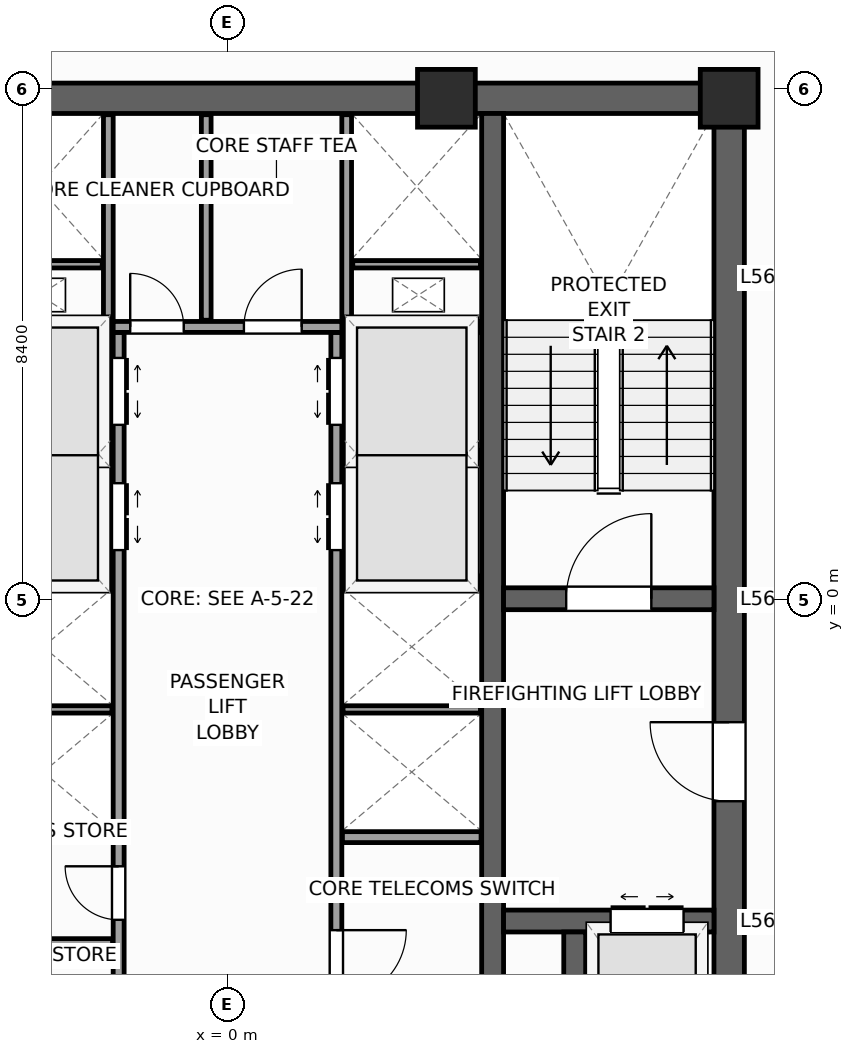
"""IFC4 building model, lengths in metres.
Left out: names, types, materials, properties, quantities, classifications, styles, units other than length and angle.
Written with IfcOpenShell. Run it as: python <this file> out.ifc"""

import sys

from ifc_helpers import new_model, si_unit, direction, frame, frame_2d, origin, origin_2d, place, context, subcontext, project, spatial, rectangle, extrude, source, transform, mapped, element, fill, save


model = new_model("IFC4")
c1 = context("Model", 3, precision=1e-05, world=origin(), true_north=direction((0.0, 1.0)))
c2 = subcontext(c1, "Body", "Model", "MODEL_VIEW")
j1 = project(units=[si_unit("LENGTHUNIT", "METRE"), si_unit("PLANEANGLEUNIT", "RADIAN")], contexts=[c1])
p1 = place(None, origin())
s1 = spatial("IfcSite", under=j1, at=p1, CompositionType="ELEMENT")
p2 = place(p1, origin())
s2 = spatial("IfcBuilding", under=s1, at=p2, CompositionType="ELEMENT")
p3 = place(p2, frame((0.0, 0.0, 232.9)))
s3 = spatial("IfcBuildingStorey", under=s2, at=p3, CompositionType="ELEMENT", Elevation=232.9)
p4 = place(p3, frame((-8.5, 8.25, 0.0), z_axis=(0.0, 0.0, 1.0), x_axis=(1.0, 0.0, 0.0)))
e1 = element("IfcWall", 1, at=p4, inside=s3, PredefinedType="SHEAR", context=c2, shape_type="SweptSolid", body=[
    extrude(rectangle(XDim=17.0, YDim=0.5, at=frame_2d((8.5, 0.0))), origin(), (0.0, 0.0, 1.0), 3.9),
])
p5 = place(p3, frame((8.25, -8.0, 0.0), z_axis=(0.0, 0.0, 1.0), x_axis=(0.0, 1.0, 0.0)))
e2 = element("IfcWall", 2, at=p5, inside=s3, PredefinedType="SHEAR", context=c2, shape_type="SweptSolid", body=[
    extrude(rectangle(XDim=16.0, YDim=0.5, at=frame_2d((8.0, 0.0))), origin(), (0.0, 0.0, 1.0), 3.9),
])
p6 = place(p5, frame((4.69, 0.0, 0.0)))
e3 = element("IfcOpeningElement", 3, at=p6, cuts=e2, PredefinedType="OPENING", context=c2, shape_type="SweptSolid", body=[
    extrude(rectangle(XDim=1.3, YDim=2.2, at=frame_2d((0.65, 1.1))), frame((0.0, 0.26, 0.0), z_axis=(0.0, -1.0, 0.0), x_axis=(1.0, 0.0, 0.0)), (0.0, 0.0, 1.0), 0.52),
])
p7 = place(p3, frame((4.36, -8.0, 0.0), z_axis=(0.0, 0.0, 1.0), x_axis=(0.0, 1.0, 0.0)))
e4 = element("IfcWall", 4, at=p7, inside=s3, PredefinedType="SHEAR", context=c2, shape_type="SweptSolid", body=[
    extrude(rectangle(XDim=16.0, YDim=0.36, at=frame_2d((8.0, 0.0))), origin(), (0.0, 0.0, 1.0), 3.9),
])
p8 = place(p3, frame((4.54, 0.02, 0.0), z_axis=(0.0, 0.0, 1.0), x_axis=(1.0, 0.0, 0.0)))
e5 = element("IfcWall", 5, at=p8, inside=s3, PredefinedType="SHEAR", context=c2, shape_type="SweptSolid", body=[
    extrude(rectangle(XDim=3.46, YDim=0.36, at=frame_2d((1.73, 0.0))), origin(), (0.0, 0.0, 1.0), 3.9),
])
p9 = place(p8, frame((1.03, 0.0, 0.0)))
e6 = element("IfcOpeningElement", 6, at=p9, cuts=e5, PredefinedType="OPENING", context=c2, shape_type="SweptSolid", body=[
    extrude(rectangle(XDim=1.4, YDim=2.2, at=frame_2d((0.7, 1.1))), frame((0.0, 0.19, 0.0), z_axis=(0.0, -1.0, 0.0), x_axis=(1.0, 0.0, 0.0)), (0.0, 0.0, 1.0), 0.38),
])
p10 = place(p3, frame((4.54, -5.28, 0.0), z_axis=(0.0, 0.0, 1.0), x_axis=(1.0, 0.0, 0.0)))
e7 = element("IfcWall", 7, at=p10, inside=s3, PredefinedType="SHEAR", context=c2, shape_type="SweptSolid", body=[
    extrude(rectangle(XDim=3.46, YDim=0.36, at=frame_2d((1.73, 0.0))), origin(), (0.0, 0.0, 1.0), 3.9),
])
p11 = place(p10, frame((1.76, 0.0, 0.0)))
e8 = element("IfcOpeningElement", 8, at=p11, cuts=e7, PredefinedType="OPENING", context=c2, shape_type="SweptSolid", body=[
    extrude(rectangle(XDim=1.2, YDim=2.25, at=frame_2d((0.6, 1.125))), frame((0.0, 0.19, 0.0), z_axis=(0.0, -1.0, 0.0), x_axis=(1.0, 0.0, 0.0)), (0.0, 0.0, 1.0), 0.38),
])
p12 = place(p3, frame((5.71, -8.0, 0.0), z_axis=(0.0, 0.0, 1.0), x_axis=(0.0, 1.0, 0.0)))
e9 = element("IfcWall", 9, at=p12, inside=s3, PredefinedType="SHEAR", context=c2, shape_type="SweptSolid", body=[
    extrude(rectangle(XDim=2.54, YDim=0.36, at=frame_2d((1.27, 0.0))), origin(), (0.0, 0.0, 1.0), 3.9),
])
m1 = source(origin(), c2, "Body", "SweptSolid", [
    extrude(rectangle(XDim=0.95, YDim=0.95, at=origin_2d()), origin(), (0.0, 0.0, 1.0), 3.9),
])
for number, where, z_axis, x_axis in (
    (10, (8.25, 8.25, 0.0), (0.0, 0.0, 1.0), (1.0, 0.0, 0.0)),
    (11, (3.6, 8.25, 0.0), (0.0, 0.0, 1.0), (1.0, 0.0, 0.0)),
):
    element("IfcColumn", number, at=place(p3, frame(where, z_axis=z_axis, x_axis=x_axis)), inside=s3, PredefinedType="PILASTER", context=c2, shape_type="MappedRepresentation", body=[
        mapped(m1, transform((0.0, 0.0, 0.0), scale=1.0)),
    ])
p13 = place(p3, frame((6.733, -29.154, 0.0), z_axis=(0.0, 0.0, 1.0), x_axis=(0.629325378072, 0.77714192302, 0.0)))
e12 = element("IfcWall", 12, at=p13, inside=s3, PredefinedType="STANDARD", context=c2, shape_type="SweptSolid", body=[
    extrude(rectangle(XDim=36.84, YDim=0.34, at=frame_2d((18.42, 0.0))), origin(), (0.0, 0.0, 1.0), 2.96),
])
p14 = place(p13, frame((23.495, 0.0, 0.0)))
e13 = element("IfcOpeningElement", 13, at=p14, cuts=e12, PredefinedType="OPENING", context=c2, shape_type="SweptSolid", body=[
    extrude(rectangle(XDim=1.05, YDim=2.25, at=frame_2d((0.525, 1.125))), frame((0.0, 0.18, 0.0), z_axis=(0.0, -1.0, 0.0), x_axis=(1.0, 0.0, 0.0)), (0.0, 0.0, 1.0), 0.36),
])
p15 = place(p13, frame((3.721, 0.0, 0.48)))
e14 = element("IfcOpeningElement", 14, at=p15, cuts=e12, PredefinedType="OPENING", context=c2, shape_type="SweptSolid", body=[
    extrude(rectangle(XDim=1.4, YDim=2.4, at=frame_2d((0.7, 1.2))), frame((0.0, 0.18, 0.0), z_axis=(0.0, -1.0, 0.0), x_axis=(1.0, 0.0, 0.0)), (0.0, 0.0, 1.0), 0.36),
])
p16 = place(p13, frame((10.559, 0.0, 0.58)))
e15 = element("IfcOpeningElement", 15, at=p16, cuts=e12, PredefinedType="OPENING", context=c2, shape_type="SweptSolid", body=[
    extrude(rectangle(XDim=1.75, YDim=2.3, at=frame_2d((0.875, 1.15))), frame((0.0, 0.18, 0.0), z_axis=(0.0, -1.0, 0.0), x_axis=(1.0, 0.0, 0.0)), (0.0, 0.0, 1.0), 0.36),
])
p17 = place(p13, frame((16.058, 0.0, 0.58)))
e16 = element("IfcOpeningElement", 16, at=p17, cuts=e12, PredefinedType="OPENING", context=c2, shape_type="SweptSolid", body=[
    extrude(rectangle(XDim=1.75, YDim=2.3, at=frame_2d((0.875, 1.15))), frame((0.0, 0.18, 0.0), z_axis=(0.0, -1.0, 0.0), x_axis=(1.0, 0.0, 0.0)), (0.0, 0.0, 1.0), 0.36),
])
p18 = place(p13, frame((25.676, 0.0, 0.58)))
e17 = element("IfcOpeningElement", 17, at=p18, cuts=e12, PredefinedType="OPENING", context=c2, shape_type="SweptSolid", body=[
    extrude(rectangle(XDim=1.75, YDim=2.3, at=frame_2d((0.875, 1.15))), frame((0.0, 0.18, 0.0), z_axis=(0.0, -1.0, 0.0), x_axis=(1.0, 0.0, 0.0)), (0.0, 0.0, 1.0), 0.36),
])
p19 = place(p13, frame((30.982, 0.0, 0.48)))
e18 = element("IfcOpeningElement", 18, at=p19, cuts=e12, PredefinedType="OPENING", context=c2, shape_type="SweptSolid", body=[
    extrude(rectangle(XDim=1.4, YDim=2.4, at=frame_2d((0.7, 1.2))), frame((0.0, 0.18, 0.0), z_axis=(0.0, -1.0, 0.0), x_axis=(1.0, 0.0, 0.0)), (0.0, 0.0, 1.0), 0.36),
])
p20 = place(p3, frame((29.154, 6.733, 0.0), z_axis=(0.0, 0.0, 1.0), x_axis=(-0.77714192302, 0.629325378072, 0.0)))
e19 = element("IfcWall", 19, at=p20, inside=s3, PredefinedType="STANDARD", context=c2, shape_type="SweptSolid", body=[
    extrude(rectangle(XDim=36.84, YDim=0.34, at=frame_2d((18.42, 0.0))), origin(), (0.0, 0.0, 1.0), 2.96),
])
p21 = place(p20, frame((3.721, 0.0, 0.48)))
e20 = element("IfcOpeningElement", 20, at=p21, cuts=e19, PredefinedType="OPENING", context=c2, shape_type="SweptSolid", body=[
    extrude(rectangle(XDim=1.4, YDim=2.4, at=frame_2d((0.7, 1.2))), frame((0.0, 0.18, 0.0), z_axis=(0.0, -1.0, 0.0), x_axis=(1.0, 0.0, 0.0)), (0.0, 0.0, 1.0), 0.36),
])
p22 = place(p20, frame((9.809, 0.0, 0.58)))
e21 = element("IfcOpeningElement", 21, at=p22, cuts=e19, PredefinedType="OPENING", context=c2, shape_type="SweptSolid", body=[
    extrude(rectangle(XDim=1.75, YDim=2.3, at=frame_2d((0.875, 1.15))), frame((0.0, 0.18, 0.0), z_axis=(0.0, -1.0, 0.0), x_axis=(1.0, 0.0, 0.0)), (0.0, 0.0, 1.0), 0.36),
])
p23 = place(p20, frame((16.058, 0.0, 0.58)))
e22 = element("IfcOpeningElement", 22, at=p23, cuts=e19, PredefinedType="OPENING", context=c2, shape_type="SweptSolid", body=[
    extrude(rectangle(XDim=1.75, YDim=2.3, at=frame_2d((0.875, 1.15))), frame((0.0, 0.18, 0.0), z_axis=(0.0, -1.0, 0.0), x_axis=(1.0, 0.0, 0.0)), (0.0, 0.0, 1.0), 0.36),
])
p24 = place(p20, frame((24.176, 0.0, 0.58)))
e23 = element("IfcOpeningElement", 23, at=p24, cuts=e19, PredefinedType="OPENING", context=c2, shape_type="SweptSolid", body=[
    extrude(rectangle(XDim=1.75, YDim=2.3, at=frame_2d((0.875, 1.15))), frame((0.0, 0.18, 0.0), z_axis=(0.0, -1.0, 0.0), x_axis=(1.0, 0.0, 0.0)), (0.0, 0.0, 1.0), 0.36),
])
p25 = place(p20, frame((32.482, 0.0, 0.48)))
e24 = element("IfcOpeningElement", 24, at=p25, cuts=e19, PredefinedType="OPENING", context=c2, shape_type="SweptSolid", body=[
    extrude(rectangle(XDim=1.4, YDim=2.4, at=frame_2d((0.7, 1.2))), frame((0.0, 0.18, 0.0), z_axis=(0.0, -1.0, 0.0), x_axis=(1.0, 0.0, 0.0)), (0.0, 0.0, 1.0), 0.36),
])
p26 = place(p3, frame((-1.79, -7.98, 0.0), z_axis=(0.0, 0.0, 1.0), x_axis=(0.0, 1.0, 0.0)))
e25 = element("IfcWall", 25, at=p26, inside=s3, PredefinedType="PARTITIONING", context=c2, shape_type="SweptSolid", body=[
    extrude(rectangle(XDim=12.38, YDim=0.18, at=frame_2d((6.19, 0.0))), origin(), (0.0, 0.0, 1.0), 3.66),
])
p27 = place(p26, frame((8.8, 0.0, 0.0)))
e26 = element("IfcOpeningElement", 26, at=p27, cuts=e25, PredefinedType="OPENING", context=c2, shape_type="SweptSolid", body=[
    extrude(rectangle(XDim=1.1, YDim=2.2, at=frame_2d((0.55, 1.1))), frame((0.0, 0.1, 0.0), z_axis=(0.0, -1.0, 0.0), x_axis=(1.0, 0.0, 0.0)), (0.0, 0.0, 1.0), 0.2),
])
p28 = place(p26, frame((10.86, 0.0, 0.0)))
e27 = element("IfcOpeningElement", 27, at=p28, cuts=e25, PredefinedType="OPENING", context=c2, shape_type="SweptSolid", body=[
    extrude(rectangle(XDim=1.1, YDim=2.2, at=frame_2d((0.55, 1.1))), frame((0.0, 0.1, 0.0), z_axis=(0.0, -1.0, 0.0), x_axis=(1.0, 0.0, 0.0)), (0.0, 0.0, 1.0), 0.2),
])
p29 = place(p26, frame((0.55, 0.0, 0.0)))
e28 = element("IfcOpeningElement", 28, at=p29, cuts=e25, PredefinedType="OPENING", context=c2, shape_type="SweptSolid", body=[
    extrude(rectangle(XDim=1.15, YDim=2.25, at=frame_2d((0.575, 1.125))), frame((0.0, 0.1, 0.0), z_axis=(0.0, -1.0, 0.0), x_axis=(1.0, 0.0, 0.0)), (0.0, 0.0, 1.0), 0.2),
])
p30 = place(p26, frame((2.72, 0.0, 0.0)))
e29 = element("IfcOpeningElement", 29, at=p30, cuts=e25, PredefinedType="OPENING", context=c2, shape_type="SweptSolid", body=[
    extrude(rectangle(XDim=0.88, YDim=2.1, at=frame_2d((0.44, 1.05))), frame((0.0, 0.1, 0.0), z_axis=(0.0, -1.0, 0.0), x_axis=(1.0, 0.0, 0.0)), (0.0, 0.0, 1.0), 0.2),
])
p31 = place(p3, frame((1.79, -7.98, 0.0), z_axis=(0.0, 0.0, 1.0), x_axis=(0.0, 1.0, 0.0)))
e30 = element("IfcWall", 30, at=p31, inside=s3, PredefinedType="PARTITIONING", context=c2, shape_type="SweptSolid", body=[
    extrude(rectangle(XDim=12.38, YDim=0.18, at=frame_2d((6.19, 0.0))), origin(), (0.0, 0.0, 1.0), 3.66),
])
p32 = place(p31, frame((8.8, 0.0, 0.0)))
e31 = element("IfcOpeningElement", 31, at=p32, cuts=e30, PredefinedType="OPENING", context=c2, shape_type="SweptSolid", body=[
    extrude(rectangle(XDim=1.1, YDim=2.2, at=frame_2d((0.55, 1.1))), frame((0.0, 0.1, 0.0), z_axis=(0.0, -1.0, 0.0), x_axis=(1.0, 0.0, 0.0)), (0.0, 0.0, 1.0), 0.2),
])
p33 = place(p31, frame((10.86, 0.0, 0.0)))
e32 = element("IfcOpeningElement", 32, at=p33, cuts=e30, PredefinedType="OPENING", context=c2, shape_type="SweptSolid", body=[
    extrude(rectangle(XDim=1.1, YDim=2.2, at=frame_2d((0.55, 1.1))), frame((0.0, 0.1, 0.0), z_axis=(0.0, -1.0, 0.0), x_axis=(1.0, 0.0, 0.0)), (0.0, 0.0, 1.0), 0.2),
])
p34 = place(p31, frame((1.4, 0.0, 0.0)))
e33 = element("IfcOpeningElement", 33, at=p34, cuts=e30, PredefinedType="OPENING", context=c2, shape_type="SweptSolid", body=[
    extrude(rectangle(XDim=1.15, YDim=2.25, at=frame_2d((0.575, 1.125))), frame((0.0, 0.1, 0.0), z_axis=(0.0, -1.0, 0.0), x_axis=(1.0, 0.0, 0.0)), (0.0, 0.0, 1.0), 0.2),
])
p35 = place(p3, frame((-1.88, 4.49, 0.0), z_axis=(0.0, 0.0, 1.0), x_axis=(1.0, 0.0, 0.0)))
e34 = element("IfcWall", 34, at=p35, inside=s3, PredefinedType="PARTITIONING", context=c2, shape_type="SweptSolid", body=[
    extrude(rectangle(XDim=3.76, YDim=0.18, at=frame_2d((1.88, 0.0))), origin(), (0.0, 0.0, 1.0), 3.66),
])
p36 = place(p35, frame((0.28, 0.0, 0.0)))
e35 = element("IfcOpeningElement", 35, at=p36, cuts=e34, PredefinedType="OPENING", context=c2, shape_type="SweptSolid", body=[
    extrude(rectangle(XDim=0.88, YDim=2.1, at=frame_2d((0.44, 1.05))), frame((0.0, 0.1, 0.0), z_axis=(0.0, -1.0, 0.0), x_axis=(1.0, 0.0, 0.0)), (0.0, 0.0, 1.0), 0.2),
])
p37 = place(p35, frame((2.15, 0.0, 0.0)))
e36 = element("IfcOpeningElement", 36, at=p37, cuts=e34, PredefinedType="OPENING", context=c2, shape_type="SweptSolid", body=[
    extrude(rectangle(XDim=0.95, YDim=2.1, at=frame_2d((0.475, 1.05))), frame((0.0, 0.1, 0.0), z_axis=(0.0, -1.0, 0.0), x_axis=(1.0, 0.0, 0.0)), (0.0, 0.0, 1.0), 0.2),
])
for number, where, z_axis, x_axis in (
    (37, (-4.17, -3.9, 0.0), (0.0, 0.0, 1.0), (1.0, 0.0, 0.0)),
    (38, (1.89, -3.9, 0.0), (0.0, 0.0, 1.0), (1.0, 0.0, 0.0)),
    (39, (-4.17, 0.3, 0.0), (0.0, 0.0, 1.0), (1.0, 0.0, 0.0)),
    (40, (1.89, 0.3, 0.0), (0.0, 0.0, 1.0), (1.0, 0.0, 0.0)),
    (41, (-4.17, 4.49, 0.0), (0.0, 0.0, 1.0), (1.0, 0.0, 0.0)),
    (42, (1.89, 4.49, 0.0), (0.0, 0.0, 1.0), (1.0, 0.0, 0.0)),
):
    element("IfcWall", number, at=place(p3, frame(where, z_axis=z_axis, x_axis=x_axis)), inside=s3, PredefinedType="PARTITIONING", context=c2, shape_type="SweptSolid", body=[
        extrude(rectangle(XDim=2.28, YDim=0.18, at=frame_2d((1.14, 0.0))), origin(), (0.0, 0.0, 1.0), 3.66),
    ])
for number, where, z_axis, x_axis in (
    (43, (-4.16, -1.8, 0.0), (0.0, 0.0, 1.0), (1.0, 0.0, 0.0)),
    (44, (1.9, -1.8, 0.0), (0.0, 0.0, 1.0), (1.0, 0.0, 0.0)),
    (45, (-4.16, 2.4, 0.0), (0.0, 0.0, 1.0), (1.0, 0.0, 0.0)),
    (46, (1.9, 2.4, 0.0), (0.0, 0.0, 1.0), (1.0, 0.0, 0.0)),
):
    element("IfcWall", number, at=place(p3, frame(where, z_axis=z_axis, x_axis=x_axis)), inside=s3, PredefinedType="PARTITIONING", context=c2, shape_type="SweptSolid", body=[
        extrude(rectangle(XDim=2.26, YDim=0.12, at=frame_2d((1.13, 0.0))), origin(), (0.0, 0.0, 1.0), 3.66),
    ])
p38 = place(p3, frame((-4.17, -5.65, 0.0), z_axis=(0.0, 0.0, 1.0), x_axis=(1.0, 0.0, 0.0)))
e47 = element("IfcWall", 47, at=p38, inside=s3, PredefinedType="PARTITIONING", context=c2, shape_type="SweptSolid", body=[
    extrude(rectangle(XDim=2.28, YDim=0.16, at=frame_2d((1.14, 0.0))), origin(), (0.0, 0.0, 1.0), 3.66),
])
for number, where, z_axis, x_axis in (
    (48, (-1.96, 4.58, 0.0), (0.0, 0.0, 1.0), (0.0, 1.0, 0.0)),
    (49, (1.96, 4.58, 0.0), (0.0, 0.0, 1.0), (0.0, 1.0, 0.0)),
):
    element("IfcWall", number, at=place(p3, frame(where, z_axis=z_axis, x_axis=x_axis)), inside=s3, PredefinedType="PARTITIONING", context=c2, shape_type="SweptSolid", body=[
        extrude(rectangle(XDim=3.4, YDim=0.16, at=frame_2d((1.7, 0.0))), origin(), (0.0, 0.0, 1.0), 3.66),
    ])
for number, where, z_axis, x_axis in (
    (50, (-4.16, 5.52, 0.0), (0.0, 0.0, 1.0), (1.0, 0.0, 0.0)),
    (51, (2.06, 5.52, 0.0), (0.0, 0.0, 1.0), (1.0, 0.0, 0.0)),
):
    element("IfcWall", number, at=place(p3, frame(where, z_axis=z_axis, x_axis=x_axis)), inside=s3, PredefinedType="PARTITIONING", context=c2, shape_type="SweptSolid", body=[
        extrude(rectangle(XDim=2.1, YDim=0.12, at=frame_2d((1.05, 0.0))), origin(), (0.0, 0.0, 1.0), 3.66),
    ])
p39 = place(p3, frame((-0.35, 4.6, 0.0), z_axis=(0.0, 0.0, 1.0), x_axis=(0.0, 1.0, 0.0)))
e52 = element("IfcWall", 52, at=p39, inside=s3, PredefinedType="PARTITIONING", context=c2, shape_type="SweptSolid", body=[
    extrude(rectangle(XDim=3.38, YDim=0.16, at=frame_2d((1.69, 0.0))), origin(), (0.0, 0.0, 1.0), 3.66),
])
m2 = source(origin(), c2, "Body", "SweptSolid", [
    extrude(rectangle(XDim=1.4, YDim=2.2, at=frame_2d((0.7, 1.1))), frame((0.0, 0.025, 0.0), z_axis=(0.0, -1.0, 0.0), x_axis=(1.0, 0.0, 0.0)), (0.0, 0.0, 1.0), 0.05),
])
p40 = place(p9, origin())
e53 = element("IfcDoor", 53, at=p40, inside=s3, OperationType="SINGLE_SWING_RIGHT", PredefinedType="DOOR", context=c2, shape_type="MappedRepresentation", body=[
    mapped(m2, transform((0.0, 0.0, 0.0), scale=1.0)),
])
fill(e6, e53)
m3 = source(origin(), c2, "Body", "SweptSolid", [
    extrude(rectangle(XDim=1.3, YDim=2.2, at=frame_2d((0.65, 1.1))), frame((0.0, 0.025, 0.0), z_axis=(0.0, -1.0, 0.0), x_axis=(1.0, 0.0, 0.0)), (0.0, 0.0, 1.0), 0.05),
])
p41 = place(p6, origin())
e54 = element("IfcDoor", 54, at=p41, inside=s3, OperationType="SINGLE_SWING_RIGHT", PredefinedType="DOOR", context=c2, shape_type="MappedRepresentation", body=[
    mapped(m3, transform((0.0, 0.0, 0.0), scale=1.0)),
])
fill(e3, e54)
m4 = source(origin(), c2, "Body", "SweptSolid", [
    extrude(rectangle(XDim=1.2, YDim=2.25, at=frame_2d((0.6, 1.125))), frame((0.0, 0.025, 0.0), z_axis=(0.0, -1.0, 0.0), x_axis=(1.0, 0.0, 0.0)), (0.0, 0.0, 1.0), 0.05),
])
p42 = place(p11, origin())
e55 = element("IfcDoor", 55, at=p42, inside=s3, OperationType="DOUBLE_DOOR_SLIDING", PredefinedType="DOOR", context=c2, shape_type="MappedRepresentation", body=[
    mapped(m4, transform((0.0, 0.0, 0.0), scale=1.0)),
])
fill(e8, e55)
m5 = source(origin(), c2, "Body", "SweptSolid", [
    extrude(rectangle(XDim=1.1, YDim=2.2, at=frame_2d((0.55, 1.1))), frame((0.0, 0.025, 0.0), z_axis=(0.0, -1.0, 0.0), x_axis=(1.0, 0.0, 0.0)), (0.0, 0.0, 1.0), 0.05),
])
p43 = place(p27, frame((1.1, 0.0, 0.0), z_axis=(0.0, 0.0, 1.0), x_axis=(-1.0, 0.0, 0.0)))
e56 = element("IfcDoor", 56, at=p43, inside=s3, OperationType="DOUBLE_DOOR_SLIDING", PredefinedType="DOOR", context=c2, shape_type="MappedRepresentation", body=[
    mapped(m5, transform((0.0, 0.0, 0.0), scale=1.0)),
])
fill(e26, e56)
p44 = place(p28, frame((1.1, 0.0, 0.0), z_axis=(0.0, 0.0, 1.0), x_axis=(-1.0, 0.0, 0.0)))
e57 = element("IfcDoor", 57, at=p44, inside=s3, OperationType="DOUBLE_DOOR_SLIDING", PredefinedType="DOOR", context=c2, shape_type="MappedRepresentation", body=[
    mapped(m5, transform((0.0, 0.0, 0.0), scale=1.0)),
])
fill(e27, e57)
p45 = place(p32, origin())
e58 = element("IfcDoor", 58, at=p45, inside=s3, OperationType="DOUBLE_DOOR_SLIDING", PredefinedType="DOOR", context=c2, shape_type="MappedRepresentation", body=[
    mapped(m5, transform((0.0, 0.0, 0.0), scale=1.0)),
])
fill(e31, e58)
p46 = place(p33, origin())
e59 = element("IfcDoor", 59, at=p46, inside=s3, OperationType="DOUBLE_DOOR_SLIDING", PredefinedType="DOOR", context=c2, shape_type="MappedRepresentation", body=[
    mapped(m5, transform((0.0, 0.0, 0.0), scale=1.0)),
])
fill(e32, e59)
m6 = source(origin(), c2, "Body", "SweptSolid", [
    extrude(rectangle(XDim=0.88, YDim=2.1, at=frame_2d((0.44, 1.05))), frame((0.0, 0.025, 0.0), z_axis=(0.0, -1.0, 0.0), x_axis=(1.0, 0.0, 0.0)), (0.0, 0.0, 1.0), 0.05),
])
p47 = place(p30, origin())
e60 = element("IfcDoor", 60, at=p47, inside=s3, OperationType="SINGLE_SWING_RIGHT", PredefinedType="DOOR", context=c2, shape_type="MappedRepresentation", body=[
    mapped(m6, transform((0.0, 0.0, 0.0), scale=1.0)),
])
fill(e29, e60)
m7 = source(origin(), c2, "Body", "SweptSolid", [
    extrude(rectangle(XDim=1.15, YDim=2.25, at=frame_2d((0.575, 1.125))), frame((0.0, 0.025, 0.0), z_axis=(0.0, -1.0, 0.0), x_axis=(1.0, 0.0, 0.0)), (0.0, 0.0, 1.0), 0.05),
])
p48 = place(p34, frame((1.15, 0.0, 0.0), z_axis=(0.0, 0.0, 1.0), x_axis=(-1.0, 0.0, 0.0)))
e61 = element("IfcDoor", 61, at=p48, inside=s3, OperationType="SINGLE_SWING_RIGHT", PredefinedType="DOOR", context=c2, shape_type="MappedRepresentation", body=[
    mapped(m7, transform((0.0, 0.0, 0.0), scale=1.0)),
])
fill(e33, e61)
p49 = place(p36, origin())
e62 = element("IfcDoor", 62, at=p49, inside=s3, OperationType="SINGLE_SWING_LEFT", PredefinedType="DOOR", context=c2, shape_type="MappedRepresentation", body=[
    mapped(m6, transform((0.0, 0.0, 0.0), scale=1.0)),
])
fill(e35, e62)
m8 = source(origin(), c2, "Body", "SweptSolid", [
    extrude(rectangle(XDim=0.95, YDim=2.1, at=frame_2d((0.475, 1.05))), frame((0.0, 0.025, 0.0), z_axis=(0.0, -1.0, 0.0), x_axis=(1.0, 0.0, 0.0)), (0.0, 0.0, 1.0), 0.05),
])
p50 = place(p37, origin())
e63 = element("IfcDoor", 63, at=p50, inside=s3, OperationType="SINGLE_SWING_RIGHT", PredefinedType="DOOR", context=c2, shape_type="MappedRepresentation", body=[
    mapped(m8, transform((0.0, 0.0, 0.0), scale=1.0)),
])
fill(e36, e63)
save(model, sys.argv[1])
